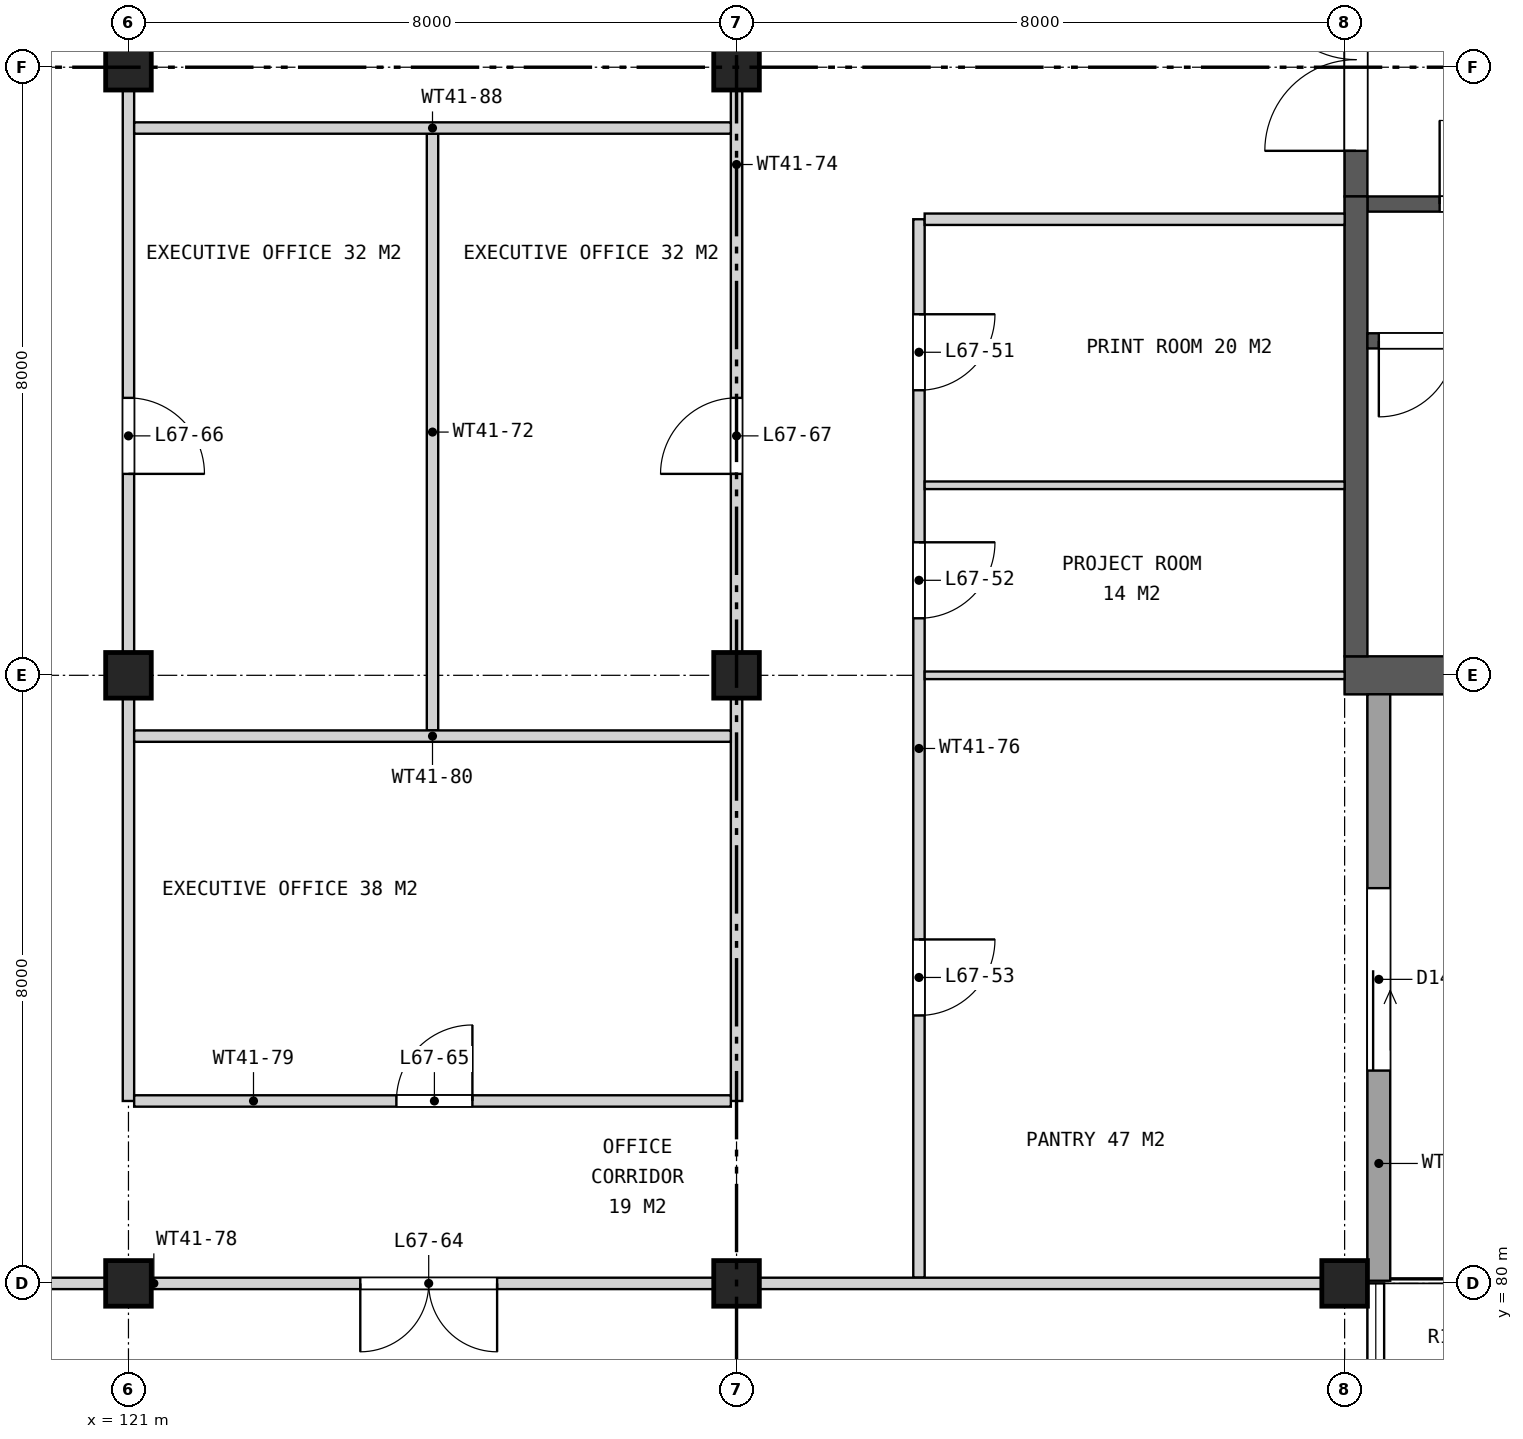
"""IFC4 building model, lengths in metres.
Left out: names, types, materials, properties, quantities, classifications, styles, units other than length and angle.
Written with IfcOpenShell. Run it as: python <this file> out.ifc"""

import sys

from ifc_helpers import new_model, si_unit, direction, frame, frame_2d, origin, origin_2d, place, context, subcontext, project, spatial, rectangle, extrude, element, fill, save


model = new_model("IFC4")
c1 = context("Model", 3, precision=1e-05, world=origin(), true_north=direction((0.0, 1.0)))
c2 = subcontext(c1, "Body", "Model", "MODEL_VIEW")
j1 = project(units=[si_unit("LENGTHUNIT", "METRE"), si_unit("PLANEANGLEUNIT", "RADIAN")], contexts=[c1])
p1 = place(None, origin())
s1 = spatial("IfcSite", under=j1, at=p1, CompositionType="ELEMENT")
p2 = place(p1, origin())
s2 = spatial("IfcBuilding", under=s1, at=p2, CompositionType="ELEMENT")
p3 = place(p2, frame((0.0, 0.0, 311.3)))
s3 = spatial("IfcBuildingStorey", under=s2, at=p3, CompositionType="ELEMENT", Elevation=311.3)
for number, where, z_axis, x_axis in (
    (1, (121.0, 80.0, 0.0), (0.0, 0.0, 1.0), (1.0, 0.0, 0.0)),
    (2, (121.0, 88.0, 0.0), (0.0, 0.0, 1.0), (1.0, 0.0, 0.0)),
    (3, (121.0, 96.0, 0.0), (0.0, 0.0, 1.0), (1.0, 0.0, 0.0)),
    (4, (129.0, 80.0, 0.0), (0.0, 0.0, 1.0), (1.0, 0.0, 0.0)),
    (5, (129.0, 88.0, 0.0), (0.0, 0.0, 1.0), (1.0, 0.0, 0.0)),
    (6, (129.0, 96.0, 0.0), (0.0, 0.0, 1.0), (1.0, 0.0, 0.0)),
    (7, (137.0, 80.0, 0.0), (0.0, 0.0, 1.0), (1.0, 0.0, 0.0)),
):
    element("IfcColumn", number, at=place(p3, frame(where, z_axis=z_axis, x_axis=x_axis)), inside=s3, PredefinedType="COLUMN", context=c2, shape_type="SweptSolid", body=[
        extrude(rectangle(XDim=0.6, YDim=0.6, at=origin_2d()), origin(), (0.0, 0.0, 1.0), 4.2),
    ])
p4 = place(p3, frame((137.0, 88.0, 0.0), z_axis=(0.0, 0.0, 1.0), x_axis=(1.0, 0.0, 0.0)))
e8 = element("IfcWall", 8, at=p4, inside=s3, PredefinedType="SHEAR", context=c2, shape_type="SweptSolid", body=[
    extrude(rectangle(XDim=7.1, YDim=0.5, at=frame_2d((3.55, 0.0))), origin(), (0.0, 0.0, 1.0), 4.2),
])
p5 = place(p3, frame((137.15, 94.3, 0.0), z_axis=(0.0, 0.0, 1.0), x_axis=(0.0, 1.0, 0.0)))
e9 = element("IfcWall", 9, at=p5, inside=s3, PredefinedType="SHEAR", context=c2, shape_type="SweptSolid", body=[
    extrude(rectangle(XDim=11.4, YDim=0.3, at=frame_2d((5.7, 0.0))), origin(), (0.0, 0.0, 1.0), 4.2),
])
p6 = place(p5, frame((0.6, 0.0, 0.0)))
e10 = element("IfcOpeningElement", 10, at=p6, cuts=e9, PredefinedType="OPENING", context=c2, shape_type="SweptSolid", body=[
    extrude(rectangle(XDim=2.4, YDim=2.4, at=frame_2d((1.2, 1.2))), frame((0.0, 0.16, 0.0), z_axis=(0.0, -1.0, 0.0), x_axis=(1.0, 0.0, 0.0)), (0.0, 0.0, 1.0), 0.32),
])
p7 = place(p5, frame((4.5, 0.0, 0.0)))
e11 = element("IfcOpeningElement", 11, at=p7, cuts=e9, PredefinedType="OPENING", context=c2, shape_type="SweptSolid", body=[
    extrude(rectangle(XDim=2.4, YDim=2.4, at=frame_2d((1.2, 1.2))), frame((0.0, 0.16, 0.0), z_axis=(0.0, -1.0, 0.0), x_axis=(1.0, 0.0, 0.0)), (0.0, 0.0, 1.0), 0.32),
])
p8 = place(p5, frame((8.4, 0.0, 0.0)))
e12 = element("IfcOpeningElement", 12, at=p8, cuts=e9, PredefinedType="OPENING", context=c2, shape_type="SweptSolid", body=[
    extrude(rectangle(XDim=2.4, YDim=2.4, at=frame_2d((1.2, 1.2))), frame((0.0, 0.16, 0.0), z_axis=(0.0, -1.0, 0.0), x_axis=(1.0, 0.0, 0.0)), (0.0, 0.0, 1.0), 0.32),
])
p9 = place(p3, frame((137.3, 94.2, 0.0), z_axis=(0.0, 0.0, 1.0), x_axis=(1.0, 0.0, 0.0)))
e13 = element("IfcWall", 13, at=p9, inside=s3, PredefinedType="SHEAR", context=c2, shape_type="SweptSolid", body=[
    extrude(rectangle(XDim=15.45, YDim=0.2, at=frame_2d((7.725, 0.0))), origin(), (0.0, 0.0, 1.0), 4.2),
])
p10 = place(p9, frame((0.95, 0.0, 0.0)))
e14 = element("IfcOpeningElement", 14, at=p10, cuts=e13, PredefinedType="OPENING", context=c2, shape_type="SweptSolid", body=[
    extrude(rectangle(XDim=1.1, YDim=2.1, at=frame_2d((0.55, 1.05))), frame((0.0, 0.11, 0.0), z_axis=(0.0, -1.0, 0.0), x_axis=(1.0, 0.0, 0.0)), (0.0, 0.0, 1.0), 0.22),
])
p11 = place(p3, frame((137.15, 88.25, 0.0), z_axis=(0.0, 0.0, 1.0), x_axis=(0.0, 1.0, 0.0)))
e15 = element("IfcWall", 15, at=p11, inside=s3, PredefinedType="SHEAR", context=c2, shape_type="SweptSolid", body=[
    extrude(rectangle(XDim=6.05, YDim=0.3, at=frame_2d((3.025, 0.0))), origin(), (0.0, 0.0, 1.0), 4.2),
])
p12 = place(p3, frame((137.3, 92.4, 0.0), z_axis=(0.0, 0.0, 1.0), x_axis=(1.0, 0.0, 0.0)))
e16 = element("IfcWall", 16, at=p12, inside=s3, PredefinedType="SHEAR", context=c2, shape_type="SweptSolid", body=[
    extrude(rectangle(XDim=6.8, YDim=0.2, at=frame_2d((3.4, 0.0))), origin(), (0.0, 0.0, 1.0), 4.2),
])
p13 = place(p12, frame((0.15, 0.0, 0.0)))
e17 = element("IfcOpeningElement", 17, at=p13, cuts=e16, PredefinedType="OPENING", context=c2, shape_type="SweptSolid", body=[
    extrude(rectangle(XDim=1.0, YDim=2.1, at=frame_2d((0.5, 1.05))), frame((0.0, 0.11, 0.0), z_axis=(0.0, -1.0, 0.0), x_axis=(1.0, 0.0, 0.0)), (0.0, 0.0, 1.0), 0.22),
])
p14 = place(p3, frame((137.45, 80.035, 0.0), z_axis=(0.0, 0.0, 1.0), x_axis=(0.0, 1.0, 0.0)))
e18 = element("IfcWall", 18, at=p14, inside=s3, PredefinedType="SOLIDWALL", context=c2, shape_type="SweptSolid", body=[
    extrude(rectangle(XDim=7.715, YDim=0.3, at=frame_2d((3.857, 0.0))), origin(), (0.0, 0.0, 1.0), 3.544),
])
p15 = place(p14, frame((2.765, 0.0, 0.0)))
e19 = element("IfcOpeningElement", 19, at=p15, cuts=e18, PredefinedType="OPENING", context=c2, shape_type="SweptSolid", body=[
    extrude(rectangle(XDim=2.4, YDim=2.4, at=frame_2d((1.2, 1.2))), frame((0.0, 0.16, 0.0), z_axis=(0.0, -1.0, 0.0), x_axis=(1.0, 0.0, 0.0)), (0.0, 0.0, 1.0), 0.32),
])
p16 = place(p3, frame((121.0, 82.4, 0.0), z_axis=(0.0, 0.0, 1.0), x_axis=(0.0, 1.0, 0.0)))
e20 = element("IfcWall", 20, at=p16, inside=s3, PredefinedType="PARTITIONING", context=c2, shape_type="SweptSolid", body=[
    extrude(rectangle(XDim=35.2, YDim=0.15, at=frame_2d((17.6, 0.0))), origin(), (0.0, 0.0, 1.0), 3.443),
])
p17 = place(p16, frame((8.25, 0.0, 0.0)))
e21 = element("IfcOpeningElement", 21, at=p17, cuts=e20, PredefinedType="OPENING", context=c2, shape_type="SweptSolid", body=[
    extrude(rectangle(XDim=1.0, YDim=2.1, at=frame_2d((0.5, 1.05))), frame((0.0, 0.085, 0.0), z_axis=(0.0, -1.0, 0.0), x_axis=(1.0, 0.0, 0.0)), (0.0, 0.0, 1.0), 0.17),
])
p18 = place(p16, frame((22.15, 0.0, 0.0)))
e22 = element("IfcOpeningElement", 22, at=p18, cuts=e20, PredefinedType="OPENING", context=c2, shape_type="SweptSolid", body=[
    extrude(rectangle(XDim=1.0, YDim=2.1, at=frame_2d((0.5, 1.05))), frame((0.0, 0.085, 0.0), z_axis=(0.0, -1.0, 0.0), x_axis=(1.0, 0.0, 0.0)), (0.0, 0.0, 1.0), 0.17),
])
p19 = place(p16, frame((26.35, 0.0, 0.0)))
e23 = element("IfcOpeningElement", 23, at=p19, cuts=e20, PredefinedType="OPENING", context=c2, shape_type="SweptSolid", body=[
    extrude(rectangle(XDim=1.0, YDim=2.1, at=frame_2d((0.5, 1.05))), frame((0.0, 0.085, 0.0), z_axis=(0.0, -1.0, 0.0), x_axis=(1.0, 0.0, 0.0)), (0.0, 0.0, 1.0), 0.17),
])
p20 = place(p3, frame((125.0, 87.275, 0.0), z_axis=(0.0, 0.0, 1.0), x_axis=(0.0, 1.0, 0.0)))
e24 = element("IfcWall", 24, at=p20, inside=s3, PredefinedType="PARTITIONING", context=c2, shape_type="SweptSolid", body=[
    extrude(rectangle(XDim=7.85, YDim=0.15, at=frame_2d((3.925, 0.0))), origin(), (0.0, 0.0, 1.0), 3.443),
])
p21 = place(p3, frame((129.0, 82.4, 0.0), z_axis=(0.0, 0.0, 1.0), x_axis=(0.0, 1.0, 0.0)))
e25 = element("IfcWall", 25, at=p21, inside=s3, PredefinedType="PARTITIONING", context=c2, shape_type="SweptSolid", body=[
    extrude(rectangle(XDim=35.2, YDim=0.15, at=frame_2d((17.6, 0.0))), origin(), (0.0, 0.0, 1.0), 3.443),
])
p22 = place(p21, frame((8.25, 0.0, 0.0)))
e26 = element("IfcOpeningElement", 26, at=p22, cuts=e25, PredefinedType="OPENING", context=c2, shape_type="SweptSolid", body=[
    extrude(rectangle(XDim=1.0, YDim=2.1, at=frame_2d((0.5, 1.05))), frame((0.0, 0.085, 0.0), z_axis=(0.0, -1.0, 0.0), x_axis=(1.0, 0.0, 0.0)), (0.0, 0.0, 1.0), 0.17),
])
p23 = place(p21, frame((15.85, 0.0, 0.0)))
e27 = element("IfcOpeningElement", 27, at=p23, cuts=e25, PredefinedType="OPENING", context=c2, shape_type="SweptSolid", body=[
    extrude(rectangle(XDim=1.0, YDim=2.1, at=frame_2d((0.5, 1.05))), frame((0.0, 0.085, 0.0), z_axis=(0.0, -1.0, 0.0), x_axis=(1.0, 0.0, 0.0)), (0.0, 0.0, 1.0), 0.17),
])
p24 = place(p21, frame((26.35, 0.0, 0.0)))
e28 = element("IfcOpeningElement", 28, at=p24, cuts=e25, PredefinedType="OPENING", context=c2, shape_type="SweptSolid", body=[
    extrude(rectangle(XDim=1.0, YDim=2.1, at=frame_2d((0.5, 1.05))), frame((0.0, 0.085, 0.0), z_axis=(0.0, -1.0, 0.0), x_axis=(1.0, 0.0, 0.0)), (0.0, 0.0, 1.0), 0.17),
])
p25 = place(p3, frame((131.4, 80.075, 0.0), z_axis=(0.0, 0.0, 1.0), x_axis=(0.0, 1.0, 0.0)))
e29 = element("IfcWall", 29, at=p25, inside=s3, PredefinedType="PARTITIONING", context=c2, shape_type="SweptSolid", body=[
    extrude(rectangle(XDim=13.925, YDim=0.15, at=frame_2d((6.962, 0.0))), origin(), (0.0, 0.0, 1.0), 3.443),
])
p26 = place(p25, frame((11.675, 0.0, 0.0)))
e30 = element("IfcOpeningElement", 30, at=p26, cuts=e29, PredefinedType="OPENING", context=c2, shape_type="SweptSolid", body=[
    extrude(rectangle(XDim=1.0, YDim=2.1, at=frame_2d((0.5, 1.05))), frame((0.0, 0.085, 0.0), z_axis=(0.0, -1.0, 0.0), x_axis=(1.0, 0.0, 0.0)), (0.0, 0.0, 1.0), 0.17),
])
p27 = place(p25, frame((8.675, 0.0, 0.0)))
e31 = element("IfcOpeningElement", 31, at=p27, cuts=e29, PredefinedType="OPENING", context=c2, shape_type="SweptSolid", body=[
    extrude(rectangle(XDim=1.0, YDim=2.1, at=frame_2d((0.5, 1.05))), frame((0.0, 0.085, 0.0), z_axis=(0.0, -1.0, 0.0), x_axis=(1.0, 0.0, 0.0)), (0.0, 0.0, 1.0), 0.17),
])
p28 = place(p25, frame((3.45, 0.0, 0.0)))
e32 = element("IfcOpeningElement", 32, at=p28, cuts=e29, PredefinedType="OPENING", context=c2, shape_type="SweptSolid", body=[
    extrude(rectangle(XDim=1.0, YDim=2.1, at=frame_2d((0.5, 1.05))), frame((0.0, 0.085, 0.0), z_axis=(0.0, -1.0, 0.0), x_axis=(1.0, 0.0, 0.0)), (0.0, 0.0, 1.0), 0.17),
])
p29 = place(p3, frame((112.78, 80.0, 0.0), z_axis=(0.0, 0.0, 1.0), x_axis=(1.0, 0.0, 0.0)))
e33 = element("IfcWall", 33, at=p29, inside=s3, PredefinedType="PARTITIONING", context=c2, shape_type="SweptSolid", body=[
    extrude(rectangle(XDim=24.44, YDim=0.15, at=frame_2d((12.22, 0.0))), origin(), (0.0, 0.0, 1.0), 3.443),
])
p30 = place(p29, frame((11.27, 0.0, 0.0)))
e34 = element("IfcOpeningElement", 34, at=p30, cuts=e33, PredefinedType="OPENING", context=c2, shape_type="SweptSolid", body=[
    extrude(rectangle(XDim=1.8, YDim=2.1, at=frame_2d((0.9, 1.05))), frame((0.0, 0.085, 0.0), z_axis=(0.0, -1.0, 0.0), x_axis=(1.0, 0.0, 0.0)), (0.0, 0.0, 1.0), 0.17),
])
p31 = place(p3, frame((121.075, 82.4, 0.0), z_axis=(0.0, 0.0, 1.0), x_axis=(1.0, 0.0, 0.0)))
e35 = element("IfcWall", 35, at=p31, inside=s3, PredefinedType="PARTITIONING", context=c2, shape_type="SweptSolid", body=[
    extrude(rectangle(XDim=7.85, YDim=0.15, at=frame_2d((3.925, 0.0))), origin(), (0.0, 0.0, 1.0), 3.443),
])
p32 = place(p31, frame((3.45, 0.0, 0.0)))
e36 = element("IfcOpeningElement", 36, at=p32, cuts=e35, PredefinedType="OPENING", context=c2, shape_type="SweptSolid", body=[
    extrude(rectangle(XDim=1.0, YDim=2.1, at=frame_2d((0.5, 1.05))), frame((0.0, 0.085, 0.0), z_axis=(0.0, -1.0, 0.0), x_axis=(1.0, 0.0, 0.0)), (0.0, 0.0, 1.0), 0.17),
])
p33 = place(p3, frame((121.075, 87.2, 0.0), z_axis=(0.0, 0.0, 1.0), x_axis=(1.0, 0.0, 0.0)))
e37 = element("IfcWall", 37, at=p33, inside=s3, PredefinedType="PARTITIONING", context=c2, shape_type="SweptSolid", body=[
    extrude(rectangle(XDim=7.85, YDim=0.15, at=frame_2d((3.925, 0.0))), origin(), (0.0, 0.0, 1.0), 3.443),
])
for number, where, z_axis, x_axis in (
    (38, (131.475, 88.0, 0.0), (0.0, 0.0, 1.0), (1.0, 0.0, 0.0)),
    (39, (131.475, 90.5, 0.0), (0.0, 0.0, 1.0), (1.0, 0.0, 0.0)),
):
    element("IfcWall", number, at=place(p3, frame(where, z_axis=z_axis, x_axis=x_axis)), inside=s3, PredefinedType="PARTITIONING", context=c2, shape_type="SweptSolid", body=[
        extrude(rectangle(XDim=5.525, YDim=0.1, at=frame_2d((2.762, 0.0))), origin(), (0.0, 0.0, 1.0), 3.443),
    ])
p34 = place(p3, frame((131.475, 94.0, 0.0), z_axis=(0.0, 0.0, 1.0), x_axis=(1.0, 0.0, 0.0)))
e40 = element("IfcWall", 40, at=p34, inside=s3, PredefinedType="PARTITIONING", context=c2, shape_type="SweptSolid", body=[
    extrude(rectangle(XDim=5.525, YDim=0.15, at=frame_2d((2.762, 0.0))), origin(), (0.0, 0.0, 1.0), 3.443),
])
p35 = place(p3, frame((121.075, 95.2, 0.0), z_axis=(0.0, 0.0, 1.0), x_axis=(1.0, 0.0, 0.0)))
e41 = element("IfcWall", 41, at=p35, inside=s3, PredefinedType="PARTITIONING", context=c2, shape_type="SweptSolid", body=[
    extrude(rectangle(XDim=7.85, YDim=0.15, at=frame_2d((3.925, 0.0))), origin(), (0.0, 0.0, 1.0), 3.443),
])
p36 = place(p6, origin())
e42 = element("IfcDoor", 42, at=p36, inside=s3, OperationType="DOUBLE_DOOR_SINGLE_SWING", PredefinedType="DOOR", context=c2, shape_type="SweptSolid", body=[
    extrude(rectangle(XDim=2.4, YDim=2.4, at=frame_2d((1.2, 1.2))), frame((0.0, 0.025, 0.0), z_axis=(0.0, -1.0, 0.0), x_axis=(1.0, 0.0, 0.0)), (0.0, 0.0, 1.0), 0.05),
])
fill(e10, e42)
p37 = place(p10, origin())
e43 = element("IfcDoor", 43, at=p37, inside=s3, OperationType="SINGLE_SWING_LEFT", PredefinedType="DOOR", context=c2, shape_type="SweptSolid", body=[
    extrude(rectangle(XDim=1.1, YDim=2.1, at=frame_2d((0.55, 1.05))), frame((0.0, 0.025, 0.0), z_axis=(0.0, -1.0, 0.0), x_axis=(1.0, 0.0, 0.0)), (0.0, 0.0, 1.0), 0.05),
])
fill(e14, e43)
p38 = place(p13, frame((1.0, 0.0, 0.0), z_axis=(0.0, 0.0, 1.0), x_axis=(-1.0, 0.0, 0.0)))
e44 = element("IfcDoor", 44, at=p38, inside=s3, OperationType="SINGLE_SWING_RIGHT", PredefinedType="DOOR", context=c2, shape_type="SweptSolid", body=[
    extrude(rectangle(XDim=1.0, YDim=2.1, at=frame_2d((0.5, 1.05))), frame((0.0, 0.025, 0.0), z_axis=(0.0, -1.0, 0.0), x_axis=(1.0, 0.0, 0.0)), (0.0, 0.0, 1.0), 0.05),
])
fill(e17, e44)
p39 = place(p15, frame((2.4, 0.0, 0.0), z_axis=(0.0, 0.0, 1.0), x_axis=(-1.0, 0.0, 0.0)))
e45 = element("IfcDoor", 45, at=p39, inside=s3, OperationType="SLIDING_TO_LEFT", PredefinedType="DOOR", context=c2, shape_type="SweptSolid", body=[
    extrude(rectangle(XDim=2.4, YDim=2.4, at=frame_2d((1.2, 1.2))), frame((0.0, 0.025, 0.0), z_axis=(0.0, -1.0, 0.0), x_axis=(1.0, 0.0, 0.0)), (0.0, 0.0, 1.0), 0.05),
])
fill(e19, e45)
p40 = place(p26, frame((1.0, 0.0, 0.0), z_axis=(0.0, 0.0, 1.0), x_axis=(-1.0, 0.0, 0.0)))
e46 = element("IfcDoor", 46, at=p40, inside=s3, OperationType="SINGLE_SWING_LEFT", PredefinedType="DOOR", context=c2, shape_type="SweptSolid", body=[
    extrude(rectangle(XDim=1.0, YDim=2.1, at=frame_2d((0.5, 1.05))), frame((0.0, 0.025, 0.0), z_axis=(0.0, -1.0, 0.0), x_axis=(1.0, 0.0, 0.0)), (0.0, 0.0, 1.0), 0.05),
])
fill(e30, e46)
p41 = place(p27, frame((1.0, 0.0, 0.0), z_axis=(0.0, 0.0, 1.0), x_axis=(-1.0, 0.0, 0.0)))
e47 = element("IfcDoor", 47, at=p41, inside=s3, OperationType="SINGLE_SWING_LEFT", PredefinedType="DOOR", context=c2, shape_type="SweptSolid", body=[
    extrude(rectangle(XDim=1.0, YDim=2.1, at=frame_2d((0.5, 1.05))), frame((0.0, 0.025, 0.0), z_axis=(0.0, -1.0, 0.0), x_axis=(1.0, 0.0, 0.0)), (0.0, 0.0, 1.0), 0.05),
])
fill(e31, e47)
p42 = place(p28, frame((1.0, 0.0, 0.0), z_axis=(0.0, 0.0, 1.0), x_axis=(-1.0, 0.0, 0.0)))
e48 = element("IfcDoor", 48, at=p42, inside=s3, OperationType="SINGLE_SWING_LEFT", PredefinedType="DOOR", context=c2, shape_type="SweptSolid", body=[
    extrude(rectangle(XDim=1.0, YDim=2.1, at=frame_2d((0.5, 1.05))), frame((0.0, 0.025, 0.0), z_axis=(0.0, -1.0, 0.0), x_axis=(1.0, 0.0, 0.0)), (0.0, 0.0, 1.0), 0.05),
])
fill(e32, e48)
p43 = place(p30, frame((1.8, 0.0, 0.0), z_axis=(0.0, 0.0, 1.0), x_axis=(-1.0, 0.0, 0.0)))
e49 = element("IfcDoor", 49, at=p43, inside=s3, OperationType="DOUBLE_DOOR_SINGLE_SWING", PredefinedType="DOOR", context=c2, shape_type="SweptSolid", body=[
    extrude(rectangle(XDim=1.8, YDim=2.1, at=frame_2d((0.9, 1.05))), frame((0.0, 0.025, 0.0), z_axis=(0.0, -1.0, 0.0), x_axis=(1.0, 0.0, 0.0)), (0.0, 0.0, 1.0), 0.05),
])
fill(e34, e49)
p44 = place(p32, origin())
e50 = element("IfcDoor", 50, at=p44, inside=s3, OperationType="SINGLE_SWING_RIGHT", PredefinedType="DOOR", context=c2, shape_type="SweptSolid", body=[
    extrude(rectangle(XDim=1.0, YDim=2.1, at=frame_2d((0.5, 1.05))), frame((0.0, 0.025, 0.0), z_axis=(0.0, -1.0, 0.0), x_axis=(1.0, 0.0, 0.0)), (0.0, 0.0, 1.0), 0.05),
])
fill(e36, e50)
p45 = place(p17, frame((1.0, 0.0, 0.0), z_axis=(0.0, 0.0, 1.0), x_axis=(-1.0, 0.0, 0.0)))
e51 = element("IfcDoor", 51, at=p45, inside=s3, OperationType="SINGLE_SWING_RIGHT", PredefinedType="DOOR", context=c2, shape_type="SweptSolid", body=[
    extrude(rectangle(XDim=1.0, YDim=2.1, at=frame_2d((0.5, 1.05))), frame((0.0, 0.025, 0.0), z_axis=(0.0, -1.0, 0.0), x_axis=(1.0, 0.0, 0.0)), (0.0, 0.0, 1.0), 0.05),
])
fill(e21, e51)
p46 = place(p22, origin())
e52 = element("IfcDoor", 52, at=p46, inside=s3, OperationType="SINGLE_SWING_LEFT", PredefinedType="DOOR", context=c2, shape_type="SweptSolid", body=[
    extrude(rectangle(XDim=1.0, YDim=2.1, at=frame_2d((0.5, 1.05))), frame((0.0, 0.025, 0.0), z_axis=(0.0, -1.0, 0.0), x_axis=(1.0, 0.0, 0.0)), (0.0, 0.0, 1.0), 0.05),
])
fill(e26, e52)
save(model, sys.argv[1])
